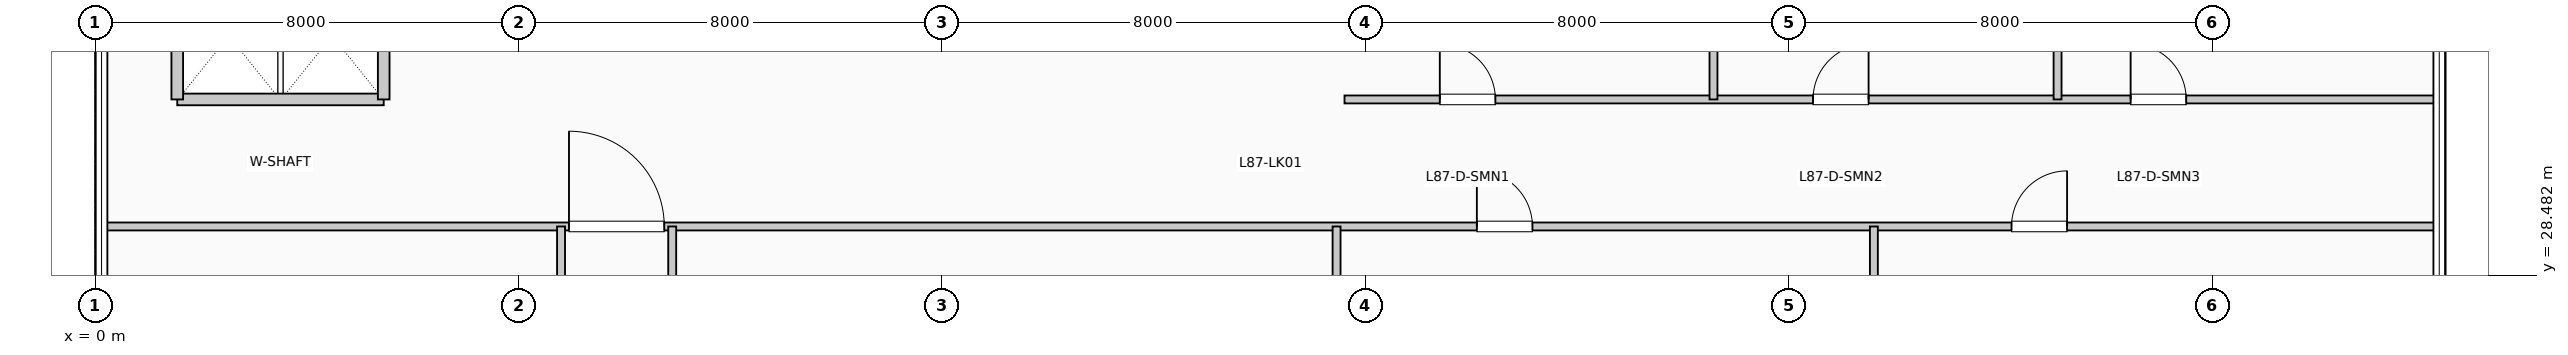
"""IFC4 building model, lengths in metres.
Left out: names, types, materials, properties, quantities, classifications, styles, units other than length and angle.
Written with IfcOpenShell. Run it as: python <this file> out.ifc"""

import sys

from ifc_helpers import new_model, si_unit, direction, frame, frame_2d, origin, place, context, subcontext, project, spatial, rectangle, extrude, element, fill, save


model = new_model("IFC4")
c1 = context("Model", 3, precision=1e-05, world=origin(), true_north=direction((0.0, 1.0)))
c2 = subcontext(c1, "Body", "Model", "MODEL_VIEW")
j1 = project(units=[si_unit("LENGTHUNIT", "METRE"), si_unit("PLANEANGLEUNIT", "RADIAN")], contexts=[c1])
p1 = place(None, origin())
s1 = spatial("IfcSite", under=j1, at=p1, CompositionType="ELEMENT")
p2 = place(p1, origin())
s2 = spatial("IfcBuilding", under=s1, at=p2, CompositionType="ELEMENT")
p3 = place(p2, frame((0.0, 0.0, 356.73)))
s3 = spatial("IfcBuildingStorey", under=s2, at=p3, CompositionType="ELEMENT", Elevation=356.73)
p4 = place(p3, frame((1.55, 31.8, 0.0), z_axis=(0.0, 0.0, 1.0), x_axis=(1.0, 0.0, 0.0)))
e1 = element("IfcWall", 1, at=p4, inside=s3, PredefinedType="PARTITIONING", context=c2, shape_type="SweptSolid", body=[
    extrude(rectangle(XDim=3.9, YDim=0.22, at=frame_2d((1.95, 0.0))), origin(), (0.0, 0.0, 1.0), 4.37),
])
for number, where, z_axis, x_axis in (
    (2, (1.55, 31.8, 0.0), (0.0, 0.0, 1.0), (0.0, 1.0, 0.0)),
    (3, (5.45, 31.8, 0.0), (0.0, 0.0, 1.0), (0.0, 1.0, 0.0)),
):
    element("IfcWall", number, at=place(p3, frame(where, z_axis=z_axis, x_axis=x_axis)), inside=s3, PredefinedType="PARTITIONING", context=c2, shape_type="SweptSolid", body=[
        extrude(rectangle(XDim=2.38, YDim=0.22, at=frame_2d((1.19, 0.0))), origin(), (0.0, 0.0, 1.0), 4.37),
    ])
p5 = place(p3, frame((0.19, 29.4, 0.0), z_axis=(0.0, 0.0, 1.0), x_axis=(1.0, 0.0, 0.0)))
e4 = element("IfcWall", 4, at=p5, inside=s3, PredefinedType="PARTITIONING", context=c2, shape_type="SweptSolid", body=[
    extrude(rectangle(XDim=44.02, YDim=0.15, at=frame_2d((22.01, 0.0))), origin(), (0.0, 0.0, 1.0), 4.055),
])
p6 = place(p5, frame((8.76, 0.0, 0.0)))
e5 = element("IfcOpeningElement", 5, at=p6, cuts=e4, PredefinedType="OPENING", context=c2, shape_type="SweptSolid", body=[
    extrude(rectangle(XDim=1.8, YDim=2.3, at=frame_2d((0.9, 1.15))), frame((0.0, 0.085, 0.0), z_axis=(0.0, -1.0, 0.0), x_axis=(1.0, 0.0, 0.0)), (0.0, 0.0, 1.0), 0.17),
])
p7 = place(p5, frame((25.91, 0.0, 0.0)))
e6 = element("IfcOpeningElement", 6, at=p7, cuts=e4, PredefinedType="OPENING", context=c2, shape_type="SweptSolid", body=[
    extrude(rectangle(XDim=1.05, YDim=2.15, at=frame_2d((0.525, 1.075))), frame((0.0, 0.085, 0.0), z_axis=(0.0, -1.0, 0.0), x_axis=(1.0, 0.0, 0.0)), (0.0, 0.0, 1.0), 0.17),
])
p8 = place(p5, frame((36.01, 0.0, 0.0)))
e7 = element("IfcOpeningElement", 7, at=p8, cuts=e4, PredefinedType="OPENING", context=c2, shape_type="SweptSolid", body=[
    extrude(rectangle(XDim=1.05, YDim=2.15, at=frame_2d((0.525, 1.075))), frame((0.0, 0.085, 0.0), z_axis=(0.0, -1.0, 0.0), x_axis=(1.0, 0.0, 0.0)), (0.0, 0.0, 1.0), 0.17),
])
p9 = place(p3, frame((23.6, 31.8, 0.0), z_axis=(0.0, 0.0, 1.0), x_axis=(1.0, 0.0, 0.0)))
e8 = element("IfcWall", 8, at=p9, inside=s3, PredefinedType="PARTITIONING", context=c2, shape_type="SweptSolid", body=[
    extrude(rectangle(XDim=20.61, YDim=0.15, at=frame_2d((10.305, 0.0))), origin(), (0.0, 0.0, 1.0), 4.37),
])
p10 = place(p9, frame((1.8, 0.0, 0.0)))
e9 = element("IfcOpeningElement", 9, at=p10, cuts=e8, PredefinedType="OPENING", context=c2, shape_type="SweptSolid", body=[
    extrude(rectangle(XDim=1.05, YDim=2.15, at=frame_2d((0.525, 1.075))), frame((0.0, 0.085, 0.0), z_axis=(0.0, -1.0, 0.0), x_axis=(1.0, 0.0, 0.0)), (0.0, 0.0, 1.0), 0.17),
])
p11 = place(p9, frame((8.85, 0.0, 0.0)))
e10 = element("IfcOpeningElement", 10, at=p11, cuts=e8, PredefinedType="OPENING", context=c2, shape_type="SweptSolid", body=[
    extrude(rectangle(XDim=1.05, YDim=2.15, at=frame_2d((0.525, 1.075))), frame((0.0, 0.085, 0.0), z_axis=(0.0, -1.0, 0.0), x_axis=(1.0, 0.0, 0.0)), (0.0, 0.0, 1.0), 0.17),
])
p12 = place(p9, frame((14.85, 0.0, 0.0)))
e11 = element("IfcOpeningElement", 11, at=p12, cuts=e8, PredefinedType="OPENING", context=c2, shape_type="SweptSolid", body=[
    extrude(rectangle(XDim=1.05, YDim=2.15, at=frame_2d((0.525, 1.075))), frame((0.0, 0.085, 0.0), z_axis=(0.0, -1.0, 0.0), x_axis=(1.0, 0.0, 0.0)), (0.0, 0.0, 1.0), 0.17),
])
p13 = place(p3, frame((8.8, 16.5, 0.0), z_axis=(0.0, 0.0, 1.0), x_axis=(0.0, 1.0, 0.0)))
e12 = element("IfcWall", 12, at=p13, inside=s3, PredefinedType="PARTITIONING", context=c2, shape_type="SweptSolid", body=[
    extrude(rectangle(XDim=12.9, YDim=0.15, at=frame_2d((6.45, 0.0))), origin(), (0.0, 0.0, 1.0), 4.37),
])
p14 = place(p13, frame((3.55, 0.0, 0.0), z_axis=(0.0, 0.0, 1.0), x_axis=(-1.0, 0.0, 0.0)))
e13 = element("IfcOpeningElement", 13, at=p14, cuts=e12, PredefinedType="OPENING", context=c2, shape_type="SweptSolid", body=[
    extrude(rectangle(XDim=1.05, YDim=2.15, at=frame_2d((0.525, 1.075))), frame((0.0, 0.085, 0.0), z_axis=(0.0, -1.0, 0.0), x_axis=(1.0, 0.0, 0.0)), (0.0, 0.0, 1.0), 0.17),
])
p15 = place(p13, frame((10.05, 0.0, 0.0), z_axis=(0.0, 0.0, 1.0), x_axis=(-1.0, 0.0, 0.0)))
e14 = element("IfcOpeningElement", 14, at=p15, cuts=e12, PredefinedType="OPENING", context=c2, shape_type="SweptSolid", body=[
    extrude(rectangle(XDim=1.05, YDim=2.15, at=frame_2d((0.525, 1.075))), frame((0.0, 0.085, 0.0), z_axis=(0.0, -1.0, 0.0), x_axis=(1.0, 0.0, 0.0)), (0.0, 0.0, 1.0), 0.17),
])
p16 = place(p3, frame((10.9, 16.5, 0.0), z_axis=(0.0, 0.0, 1.0), x_axis=(0.0, 1.0, 0.0)))
e15 = element("IfcWall", 15, at=p16, inside=s3, PredefinedType="PARTITIONING", context=c2, shape_type="SweptSolid", body=[
    extrude(rectangle(XDim=12.9, YDim=0.15, at=frame_2d((6.45, 0.0))), origin(), (0.0, 0.0, 1.0), 4.37),
])
p17 = place(p16, frame((3.5, 0.0, 0.0)))
e16 = element("IfcOpeningElement", 16, at=p17, cuts=e15, PredefinedType="OPENING", context=c2, shape_type="SweptSolid", body=[
    extrude(rectangle(XDim=1.05, YDim=2.15, at=frame_2d((0.525, 1.075))), frame((0.0, 0.085, 0.0), z_axis=(0.0, -1.0, 0.0), x_axis=(1.0, 0.0, 0.0)), (0.0, 0.0, 1.0), 0.17),
])
p18 = place(p16, frame((9.0, 0.0, 0.0)))
e17 = element("IfcOpeningElement", 17, at=p18, cuts=e15, PredefinedType="OPENING", context=c2, shape_type="SweptSolid", body=[
    extrude(rectangle(XDim=1.05, YDim=2.15, at=frame_2d((0.525, 1.075))), frame((0.0, 0.085, 0.0), z_axis=(0.0, -1.0, 0.0), x_axis=(1.0, 0.0, 0.0)), (0.0, 0.0, 1.0), 0.17),
])
p19 = place(p3, frame((23.45, 12.64, 0.0), z_axis=(0.0, 0.0, 1.0), x_axis=(0.0, 1.0, 0.0)))
e18 = element("IfcWall", 18, at=p19, inside=s3, PredefinedType="PARTITIONING", context=c2, shape_type="SweptSolid", body=[
    extrude(rectangle(XDim=16.76, YDim=0.15, at=frame_2d((8.38, 0.0))), origin(), (0.0, 0.0, 1.0), 3.855),
])
p20 = place(p3, frame((33.6, 25.19, 0.0), z_axis=(0.0, 0.0, 1.0), x_axis=(0.0, 1.0, 0.0)))
e19 = element("IfcWall", 19, at=p20, inside=s3, PredefinedType="PARTITIONING", context=c2, shape_type="SweptSolid", body=[
    extrude(rectangle(XDim=4.21, YDim=0.15, at=frame_2d((2.105, 0.0))), origin(), (0.0, 0.0, 1.0), 4.37),
])
for number, where, z_axis, x_axis in (
    (20, (30.57, 31.8, 0.0), (0.0, 0.0, 1.0), (0.0, 1.0, 0.0)),
    (21, (37.07, 31.8, 0.0), (0.0, 0.0, 1.0), (0.0, 1.0, 0.0)),
):
    element("IfcWall", number, at=place(p3, frame(where, z_axis=z_axis, x_axis=x_axis)), inside=s3, PredefinedType="PARTITIONING", context=c2, shape_type="SweptSolid", body=[
        extrude(rectangle(XDim=14.01, YDim=0.15, at=frame_2d((7.005, 0.0))), origin(), (0.0, 0.0, 1.0), 4.37),
    ])
p21 = place(p6, origin())
e22 = element("IfcDoor", 22, at=p21, inside=s3, OperationType="SINGLE_SWING_LEFT", PredefinedType="DOOR", context=c2, shape_type="SweptSolid", body=[
    extrude(rectangle(XDim=1.8, YDim=2.3, at=frame_2d((0.9, 1.15))), frame((0.0, 0.025, 0.0), z_axis=(0.0, -1.0, 0.0), x_axis=(1.0, 0.0, 0.0)), (0.0, 0.0, 1.0), 0.05),
])
fill(e5, e22)
p22 = place(p7, origin())
e23 = element("IfcDoor", 23, at=p22, inside=s3, OperationType="SINGLE_SWING_LEFT", PredefinedType="DOOR", context=c2, shape_type="SweptSolid", body=[
    extrude(rectangle(XDim=1.05, YDim=2.15, at=frame_2d((0.525, 1.075))), frame((0.0, 0.025, 0.0), z_axis=(0.0, -1.0, 0.0), x_axis=(1.0, 0.0, 0.0)), (0.0, 0.0, 1.0), 0.05),
])
fill(e6, e23)
p23 = place(p8, origin())
e24 = element("IfcDoor", 24, at=p23, inside=s3, OperationType="SINGLE_SWING_RIGHT", PredefinedType="DOOR", context=c2, shape_type="SweptSolid", body=[
    extrude(rectangle(XDim=1.05, YDim=2.15, at=frame_2d((0.525, 1.075))), frame((0.0, 0.025, 0.0), z_axis=(0.0, -1.0, 0.0), x_axis=(1.0, 0.0, 0.0)), (0.0, 0.0, 1.0), 0.05),
])
fill(e7, e24)
p24 = place(p10, origin())
e25 = element("IfcDoor", 25, at=p24, inside=s3, OperationType="SINGLE_SWING_LEFT", PredefinedType="DOOR", context=c2, shape_type="SweptSolid", body=[
    extrude(rectangle(XDim=1.05, YDim=2.15, at=frame_2d((0.525, 1.075))), frame((0.0, 0.025, 0.0), z_axis=(0.0, -1.0, 0.0), x_axis=(1.0, 0.0, 0.0)), (0.0, 0.0, 1.0), 0.05),
])
fill(e9, e25)
p25 = place(p11, origin())
e26 = element("IfcDoor", 26, at=p25, inside=s3, OperationType="SINGLE_SWING_RIGHT", PredefinedType="DOOR", context=c2, shape_type="SweptSolid", body=[
    extrude(rectangle(XDim=1.05, YDim=2.15, at=frame_2d((0.525, 1.075))), frame((0.0, 0.025, 0.0), z_axis=(0.0, -1.0, 0.0), x_axis=(1.0, 0.0, 0.0)), (0.0, 0.0, 1.0), 0.05),
])
fill(e10, e26)
p26 = place(p12, origin())
e27 = element("IfcDoor", 27, at=p26, inside=s3, OperationType="SINGLE_SWING_LEFT", PredefinedType="DOOR", context=c2, shape_type="SweptSolid", body=[
    extrude(rectangle(XDim=1.05, YDim=2.15, at=frame_2d((0.525, 1.075))), frame((0.0, 0.025, 0.0), z_axis=(0.0, -1.0, 0.0), x_axis=(1.0, 0.0, 0.0)), (0.0, 0.0, 1.0), 0.05),
])
fill(e11, e27)
save(model, sys.argv[1])
